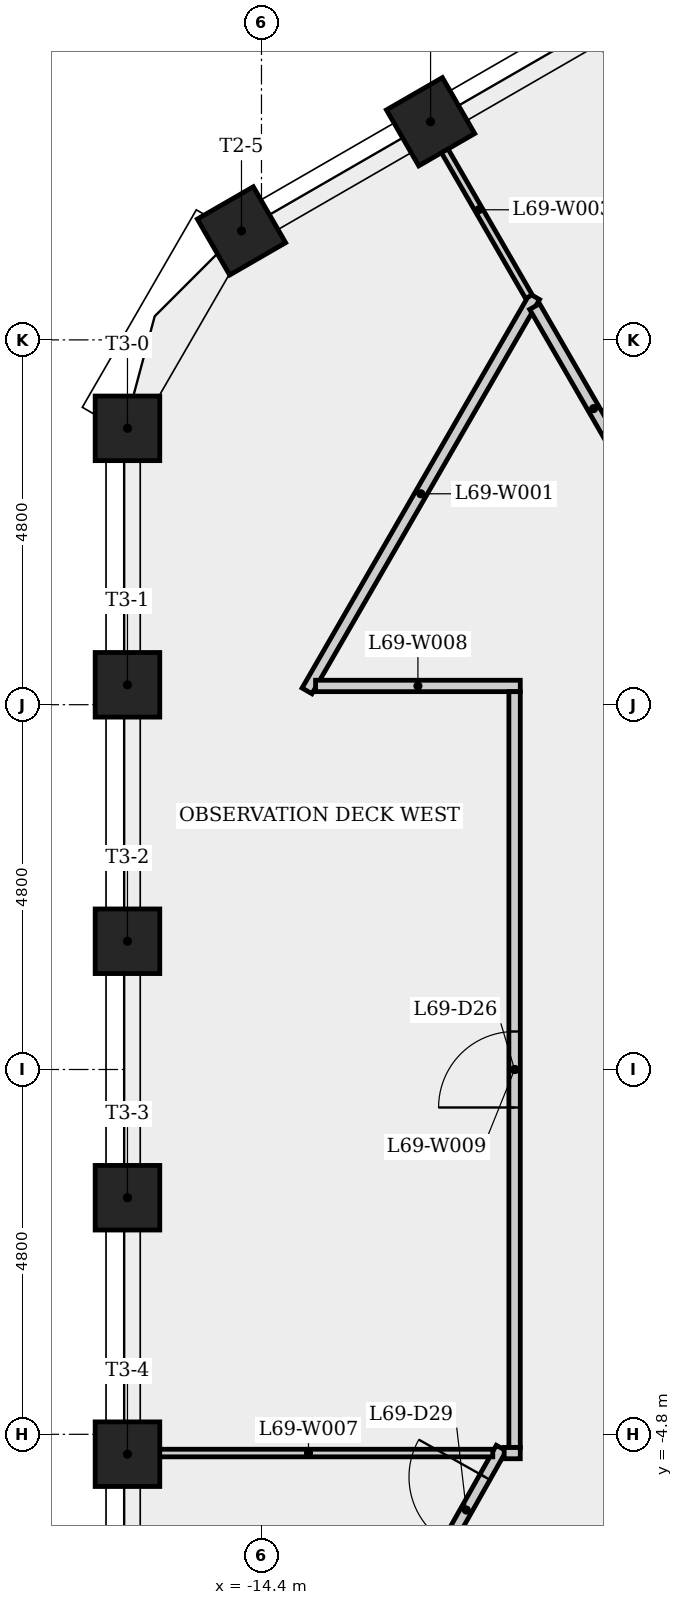
"""IFC4 building model, lengths in metres.
Left out: names, types, materials, properties, quantities, classifications, styles, units other than length and angle.
Written with IfcOpenShell. Run it as: python <this file> out.ifc"""

import sys

from ifc_helpers import new_model, si_unit, direction, frame, frame_2d, origin, origin_2d, place, context, subcontext, project, spatial, rectangle, extrude, element, fill, save


model = new_model("IFC4")
c1 = context("Model", 3, precision=1e-05, world=origin(), true_north=direction((0.0, 1.0)))
c2 = subcontext(c1, "Body", "Model", "MODEL_VIEW")
j1 = project(units=[si_unit("LENGTHUNIT", "METRE"), si_unit("PLANEANGLEUNIT", "RADIAN")], contexts=[c1])
p1 = place(None, origin())
s1 = spatial("IfcSite", under=j1, at=p1, CompositionType="ELEMENT")
p2 = place(p1, origin())
s2 = spatial("IfcBuilding", under=s1, at=p2, CompositionType="ELEMENT")
p3 = place(p2, frame((0.0, 0.0, 257.9)))
s3 = spatial("IfcBuildingStorey", under=s2, at=p3, CompositionType="ELEMENT", Elevation=257.9)
for number, where, z_axis, x_axis in (
    (1, (-9.688, 13.907, 0.0), (0.0, 0.0, 1.0), (-0.5, 0.866, 0.0)),
    (2, (-12.175, 12.47, 0.0), (0.0, 0.0, 1.0), (-0.5, 0.866, 0.0)),
    (3, (-14.663, 11.034, 0.0), (0.0, 0.0, 1.0), (-0.5, 0.866, 0.0)),
    (4, (-16.163, 8.436, 0.0), (0.0, 0.0, 1.0), (-1.0, 0.0, 0.0)),
    (5, (-16.163, 5.062, 0.0), (0.0, 0.0, 1.0), (-1.0, 0.0, 0.0)),
    (6, (-16.163, 1.687, 0.0), (0.0, 0.0, 1.0), (-1.0, 0.0, 0.0)),
    (7, (-16.163, -1.687, 0.0), (0.0, 0.0, 1.0), (-1.0, 0.0, 0.0)),
    (8, (-16.163, -5.062, 0.0), (0.0, 0.0, 1.0), (-1.0, 0.0, 0.0)),
):
    element("IfcColumn", number, at=place(p3, frame(where, z_axis=z_axis, x_axis=x_axis)), inside=s3, PredefinedType="COLUMN", context=c2, shape_type="SweptSolid", body=[
        extrude(rectangle(XDim=0.85, YDim=0.85, at=origin_2d()), origin(), (0.0, 0.0, 1.0), 5.0),
    ])
p4 = place(p3, frame((-13.801, 4.982, 0.0), z_axis=(0.0, 0.0, 1.0), x_axis=(0.499988265988, 0.866032178313, 0.0)))
e9 = element("IfcWall", 9, at=p4, inside=s3, PredefinedType="PARTITIONING", context=c2, shape_type="SweptSolid", body=[
    extrude(rectangle(XDim=5.99, YDim=0.15, at=frame_2d((2.995, 0.0))), origin(), (0.0, 0.0, 1.0), 4.6),
])
p5 = place(p3, frame((-12.201, 12.455, 0.0), z_axis=(0.0, 0.0, 1.0), x_axis=(0.499967916833, -0.866043926217, 0.0)))
e10 = element("IfcWall", 10, at=p5, inside=s3, PredefinedType="PARTITIONING", context=c2, shape_type="SweptSolid", body=[
    extrude(rectangle(XDim=2.64, YDim=0.1, at=frame_2d((1.32, 0.0))), origin(), (0.0, 0.0, 1.0), 4.6),
])
p6 = place(p3, frame((-12.111, -6.518, 0.0), z_axis=(0.0, 0.0, 1.0), x_axis=(0.491226952913, 0.871031618675, 0.0)))
e11 = element("IfcWall", 11, at=p6, inside=s3, PredefinedType="PARTITIONING", context=c2, shape_type="SweptSolid", body=[
    extrude(rectangle(XDim=1.764, YDim=0.15, at=frame_2d((0.882, 0.0))), origin(), (0.0, 0.0, 1.0), 4.6),
])
p7 = place(p6, frame((0.327, 0.0, 0.0)))
e12 = element("IfcOpeningElement", 12, at=p7, cuts=e11, PredefinedType="OPENING", context=c2, shape_type="SweptSolid", body=[
    extrude(rectangle(XDim=1.0, YDim=2.1, at=frame_2d((0.5, 1.05))), frame((0.0, 0.085, 0.0), z_axis=(0.0, -1.0, 0.0), x_axis=(1.0, 0.0, 0.0)), (0.0, 0.0, 1.0), 0.17),
])
p8 = place(p3, frame((-11.207, -5.047, 0.0), z_axis=(0.0, 0.0, 1.0), x_axis=(1.0, 0.0, 0.0)))
e13 = element("IfcWall", 13, at=p8, inside=s3, PredefinedType="PARTITIONING", context=c2, shape_type="SweptSolid", body=[
    extrude(rectangle(XDim=0.211, YDim=0.15, at=frame_2d((0.106, 0.0))), origin(), (0.0, 0.0, 1.0), 4.6),
])
p9 = place(p3, frame((-11.356, -5.047, 0.0), z_axis=(0.0, 0.0, 1.0), x_axis=(-1.0, 0.0, 0.0)))
e14 = element("IfcWall", 14, at=p9, inside=s3, PredefinedType="PARTITIONING", context=c2, shape_type="SweptSolid", body=[
    extrude(rectangle(XDim=4.85, YDim=0.1, at=frame_2d((2.425, 0.0))), origin(), (0.0, 0.0, 1.0), 4.6),
])
p10 = place(p3, frame((-10.995, 5.047, 0.0), z_axis=(0.0, 0.0, 1.0), x_axis=(-1.0, 0.0, 0.0)))
e15 = element("IfcWall", 15, at=p10, inside=s3, PredefinedType="PARTITIONING", context=c2, shape_type="SweptSolid", body=[
    extrude(rectangle(XDim=2.693, YDim=0.15, at=frame_2d((1.347, 0.0))), origin(), (0.0, 0.0, 1.0), 4.6),
])
p11 = place(p3, frame((-11.07, -4.972, 0.0), z_axis=(0.0, 0.0, 1.0), x_axis=(0.0, 1.0, 0.0)))
e16 = element("IfcWall", 16, at=p11, inside=s3, PredefinedType="PARTITIONING", context=c2, shape_type="SweptSolid", body=[
    extrude(rectangle(XDim=9.943, YDim=0.15, at=frame_2d((4.972, 0.0))), origin(), (0.0, 0.0, 1.0), 4.6),
])
p12 = place(p11, frame((4.472, 0.0, 0.0)))
e17 = element("IfcOpeningElement", 17, at=p12, cuts=e16, PredefinedType="OPENING", context=c2, shape_type="SweptSolid", body=[
    extrude(rectangle(XDim=1.0, YDim=2.1, at=frame_2d((0.5, 1.05))), frame((0.0, 0.085, 0.0), z_axis=(0.0, -1.0, 0.0), x_axis=(1.0, 0.0, 0.0)), (0.0, 0.0, 1.0), 0.17),
])
p13 = place(p3, frame((-10.806, 10.039, 0.0), z_axis=(0.0, 0.0, 1.0), x_axis=(0.499990416364, -0.866030936828, 0.0)))
e18 = element("IfcWall", 18, at=p13, inside=s3, PredefinedType="PARTITIONING", context=c2, shape_type="SweptSolid", body=[
    extrude(rectangle(XDim=3.102, YDim=0.15, at=frame_2d((1.551, 0.0))), origin(), (0.0, 0.0, 1.0), 4.6),
])
p14 = place(p12, origin())
e19 = element("IfcDoor", 19, at=p14, inside=s3, OperationType="SINGLE_SWING_LEFT", PredefinedType="DOOR", context=c2, shape_type="SweptSolid", body=[
    extrude(rectangle(XDim=1.0, YDim=2.1, at=frame_2d((0.5, 1.05))), frame((0.0, 0.025, 0.0), z_axis=(0.0, -1.0, 0.0), x_axis=(1.0, 0.0, 0.0)), (0.0, 0.0, 1.0), 0.05),
])
fill(e17, e19)
p15 = place(p7, origin())
e20 = element("IfcDoor", 20, at=p15, inside=s3, OperationType="SINGLE_SWING_RIGHT", PredefinedType="DOOR", context=c2, shape_type="SweptSolid", body=[
    extrude(rectangle(XDim=1.0, YDim=2.1, at=frame_2d((0.5, 1.05))), frame((0.0, 0.025, 0.0), z_axis=(0.0, -1.0, 0.0), x_axis=(1.0, 0.0, 0.0)), (0.0, 0.0, 1.0), 0.05),
])
fill(e12, e20)
save(model, sys.argv[1])
